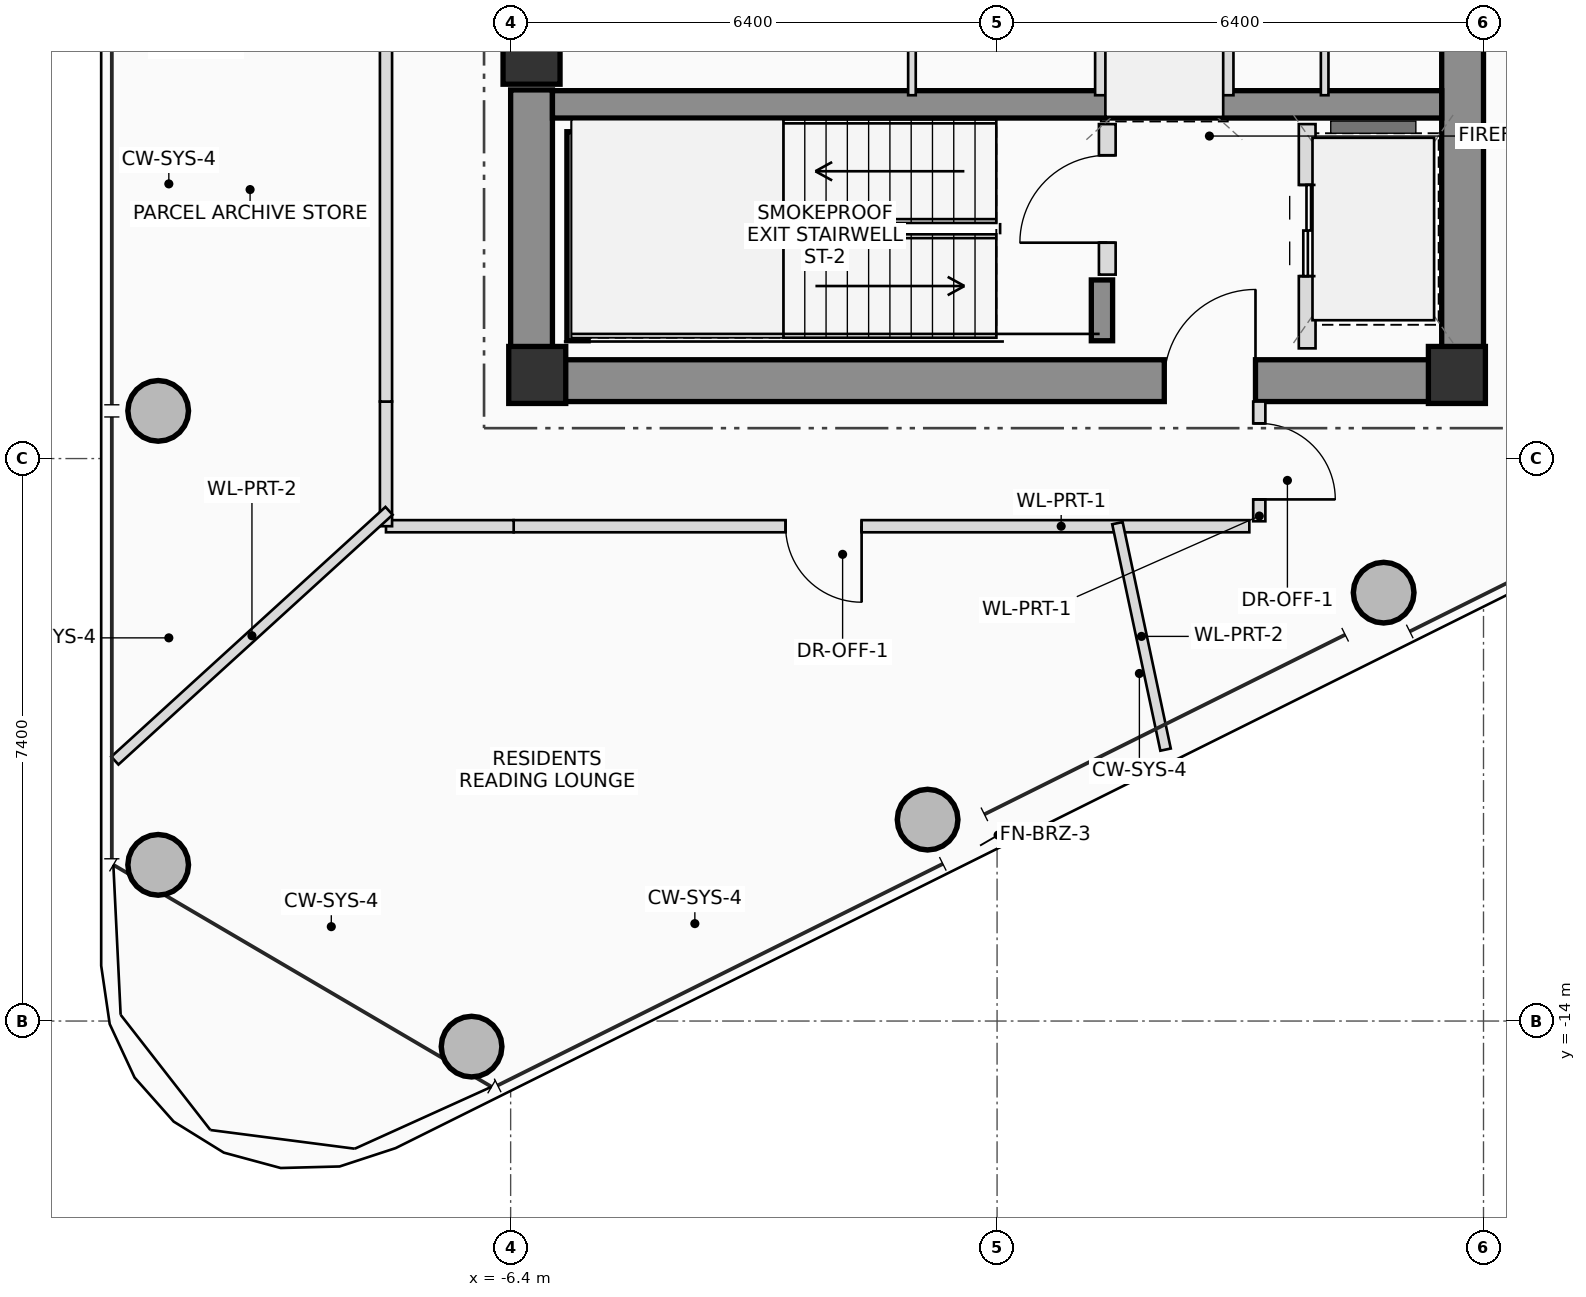
"""IFC4 building model, lengths in metres.
Left out: names, types, materials, properties, quantities, classifications, styles, units other than length and angle.
Written with IfcOpenShell. Run it as: python <this file> out.ifc"""

import sys

from ifc_helpers import new_model, si_unit, direction, frame, frame_2d, origin, origin_2d, place, context, subcontext, project, spatial, rectangle, hollow_circle, extrude, source, transform, mapped, element, fill, save


model = new_model("IFC4")
c1 = context("Model", 3, precision=1e-05, world=origin(), true_north=direction((0.0, 1.0)))
c2 = subcontext(c1, "Body", "Model", "MODEL_VIEW")
j1 = project(units=[si_unit("LENGTHUNIT", "METRE"), si_unit("PLANEANGLEUNIT", "RADIAN")], contexts=[c1])
p1 = place(None, origin())
s1 = spatial("IfcSite", under=j1, at=p1, CompositionType="ELEMENT")
p2 = place(p1, origin())
s2 = spatial("IfcBuilding", under=s1, at=p2, CompositionType="ELEMENT")
p3 = place(p2, frame((0.0, 0.0, 289.85)))
s3 = spatial("IfcBuildingStorey", under=s2, at=p3, CompositionType="ELEMENT", Elevation=289.85)
m1 = source(origin(), c2, "Body", "SweptSolid", [
    extrude(rectangle(XDim=0.75, YDim=0.75, at=origin_2d()), origin(), (0.0, 0.0, 1.0), 3.45),
])
for number, where, z_axis, x_axis in (
    (1, (-6.05, -5.5, 0.0), (0.0, 0.0, 1.0), (1.0, 0.0, 0.0)),
    (2, (6.05, -5.5, 0.0), (0.0, 0.0, 1.0), (1.0, 0.0, 0.0)),
):
    element("IfcColumn", number, at=place(p3, frame(where, z_axis=z_axis, x_axis=x_axis)), inside=s3, PredefinedType="COLUMN", context=c2, shape_type="MappedRepresentation", body=[
        mapped(m1, transform((0.0, 0.0, 0.0), scale=1.0)),
    ])
p4 = place(p3, frame((-6.4, -5.575, 0.0), z_axis=(0.0, 0.0, 1.0), x_axis=(1.0, 0.0, 0.0)))
e3 = element("IfcWall", 3, at=p4, inside=s3, PredefinedType="SHEAR", context=c2, shape_type="SweptSolid", body=[
    extrude(rectangle(XDim=12.8, YDim=0.55, at=frame_2d((6.4, 0.0))), origin(), (0.0, 0.0, 1.0), 3.45),
])
p5 = place(p4, frame((8.6, 0.0, 0.0)))
e4 = element("IfcOpeningElement", 4, at=p5, cuts=e3, PredefinedType="OPENING", context=c2, shape_type="SweptSolid", body=[
    extrude(rectangle(XDim=1.2, YDim=2.2, at=frame_2d((0.6, 1.1))), frame((0.0, 0.285, 0.0), z_axis=(0.0, -1.0, 0.0), x_axis=(1.0, 0.0, 0.0)), (0.0, 0.0, 1.0), 0.57),
])
p6 = place(p3, frame((6.125, -5.3, 0.0), z_axis=(0.0, 0.0, 1.0), x_axis=(0.0, 1.0, 0.0)))
e5 = element("IfcWall", 5, at=p6, inside=s3, PredefinedType="SHEAR", context=c2, shape_type="SweptSolid", body=[
    extrude(rectangle(XDim=10.6, YDim=0.55, at=frame_2d((5.3, 0.0))), origin(), (0.0, 0.0, 1.0), 3.45),
])
p7 = place(p3, frame((-6.125, -5.3, 0.0), z_axis=(0.0, 0.0, 1.0), x_axis=(0.0, 1.0, 0.0)))
e6 = element("IfcWall", 6, at=p7, inside=s3, PredefinedType="SHEAR", context=c2, shape_type="SweptSolid", body=[
    extrude(rectangle(XDim=3.55, YDim=0.55, at=frame_2d((1.775, 0.0))), origin(), (0.0, 0.0, 1.0), 3.45),
])
p8 = place(p3, frame((-5.85, -1.94, 0.0), z_axis=(0.0, 0.0, 1.0), x_axis=(1.0, 0.0, 0.0)))
e7 = element("IfcWall", 7, at=p8, inside=s3, PredefinedType="SHEAR", context=c2, shape_type="SweptSolid", body=[
    extrude(rectangle(XDim=11.7, YDim=0.36, at=frame_2d((5.85, 0.0))), origin(), (0.0, 0.0, 1.0), 3.45),
])
p9 = place(p3, frame((-5.52, -5.05, 0.0), z_axis=(0.0, 0.0, 1.0), x_axis=(0.0, 1.0, 0.0)))
e8 = element("IfcWall", 8, at=p9, inside=s3, PredefinedType="SHEAR", context=c2, shape_type="SweptSolid", body=[
    extrude(rectangle(XDim=2.75, YDim=0.28, at=frame_2d((1.375, 0.0))), origin(), (0.0, 0.0, 1.0), 3.45),
])
p10 = place(p3, frame((1.38, -5.05, 0.0), z_axis=(0.0, 0.0, 1.0), x_axis=(0.0, 1.0, 0.0)))
e9 = element("IfcWall", 9, at=p10, inside=s3, PredefinedType="SHEAR", context=c2, shape_type="SweptSolid", body=[
    extrude(rectangle(XDim=0.8, YDim=0.28, at=frame_2d((0.4, 0.0))), origin(), (0.0, 0.0, 1.0), 3.45),
])
p11 = place(p3, frame((-6.125, -1.3, 0.0), z_axis=(0.0, 0.0, 1.0), x_axis=(1.0, 0.0, 0.0)))
e10 = element("IfcColumn", 10, at=p11, inside=s3, PredefinedType="COLUMN", context=c2, shape_type="MappedRepresentation", body=[
    mapped(m1, transform((0.0, 0.0, 0.0), scale=1.0)),
])
m2 = source(origin(), c2, "Body", "SweptSolid", [
    extrude(hollow_circle(Radius=0.4, WallThickness=0.028, at=origin_2d()), origin(), (0.0, 0.0, 1.0), 3.45),
])
for number, where, z_axis, x_axis in (
    (11, (-6.914, -14.337, 0.0), (0.0, 0.0, 1.0), (1.0, 0.0, 0.0)),
    (12, (-0.914, -11.35, 0.0), (0.0, 0.0, 1.0), (1.0, 0.0, 0.0)),
    (13, (5.086, -8.364, 0.0), (0.0, 0.0, 1.0), (1.0, 0.0, 0.0)),
    (14, (-11.037, -5.973, 0.0), (0.0, 0.0, 1.0), (1.0, 0.0, 0.0)),
    (15, (-11.037, -11.945, 0.0), (0.0, 0.0, 1.0), (1.0, 0.0, 0.0)),
):
    element("IfcColumn", number, at=place(p3, frame(where, z_axis=z_axis, x_axis=x_axis)), inside=s3, PredefinedType="COLUMN", context=c2, shape_type="MappedRepresentation", body=[
        mapped(m2, transform((0.0, 0.0, 0.0), scale=1.0)),
    ])
p12 = place(p3, frame((1.45, -4.18, 0.0), z_axis=(0.0, 0.0, 1.0), x_axis=(0.0, 1.0, 0.0)))
e16 = element("IfcWall", 16, at=p12, inside=s3, PredefinedType="PLUMBINGWALL", context=c2, shape_type="SweptSolid", body=[
    extrude(rectangle(XDim=1.98, YDim=0.22, at=frame_2d((0.99, 0.0))), origin(), (0.0, 0.0, 1.0), 3.25),
])
p13 = place(p12, frame((0.42, 0.0, 0.0)))
e17 = element("IfcOpeningElement", 17, at=p13, cuts=e16, PredefinedType="OPENING", context=c2, shape_type="SweptSolid", body=[
    extrude(rectangle(XDim=1.15, YDim=2.15, at=frame_2d((0.575, 1.075))), frame((0.0, 0.12, 0.0), z_axis=(0.0, -1.0, 0.0), x_axis=(1.0, 0.0, 0.0)), (0.0, 0.0, 1.0), 0.24),
])
p14 = place(p3, frame((4.08, -5.15, 0.0), z_axis=(0.0, 0.0, 1.0), x_axis=(0.0, 1.0, 0.0)))
e18 = element("IfcWall", 18, at=p14, inside=s3, PredefinedType="PLUMBINGWALL", context=c2, shape_type="SweptSolid", body=[
    extrude(rectangle(XDim=2.95, YDim=0.22, at=frame_2d((1.475, 0.0))), origin(), (0.0, 0.0, 1.0), 3.25),
])
p15 = place(p14, frame((0.95, 0.0, 0.0)))
e19 = element("IfcOpeningElement", 19, at=p15, cuts=e18, PredefinedType="OPENING", context=c2, shape_type="SweptSolid", body=[
    extrude(rectangle(XDim=1.2, YDim=2.25, at=frame_2d((0.6, 1.125))), frame((0.0, 0.12, 0.0), z_axis=(0.0, -1.0, 0.0), x_axis=(1.0, 0.0, 0.0)), (0.0, 0.0, 1.0), 0.24),
])
p16 = place(p3, frame((-1.12, -1.82, 0.0), z_axis=(0.0, 0.0, 1.0), x_axis=(0.0, 1.0, 0.0)))
e20 = element("IfcWall", 20, at=p16, inside=s3, PredefinedType="PARTITIONING", context=c2, shape_type="SweptSolid", body=[
    extrude(rectangle(XDim=0.98, YDim=0.1, at=frame_2d((0.49, 0.0))), origin(), (0.0, 0.0, 1.0), 3.25),
])
for number, where, z_axis, x_axis in (
    (21, (1.38, -1.82, 0.0), (0.0, 0.0, 1.0), (0.0, 1.0, 0.0)),
    (22, (3.02, -1.82, 0.0), (0.0, 0.0, 1.0), (0.0, 1.0, 0.0)),
):
    element("IfcWall", number, at=place(p3, frame(where, z_axis=z_axis, x_axis=x_axis)), inside=s3, PredefinedType="PLUMBINGWALL", context=c2, shape_type="SweptSolid", body=[
        extrude(rectangle(XDim=0.98, YDim=0.18, at=frame_2d((0.49, 0.0))), origin(), (0.0, 0.0, 1.0), 3.25),
    ])
p17 = place(p3, frame((4.31, -1.82, 0.0), z_axis=(0.0, 0.0, 1.0), x_axis=(0.0, 1.0, 0.0)))
e23 = element("IfcWall", 23, at=p17, inside=s3, PredefinedType="PARTITIONING", context=c2, shape_type="SweptSolid", body=[
    extrude(rectangle(XDim=0.98, YDim=0.1, at=frame_2d((0.49, 0.0))), origin(), (0.0, 0.0, 1.0), 3.25),
])
p18 = place(p3, frame((3.45, -5.85, 0.0), z_axis=(0.0, 0.0, 1.0), x_axis=(0.0, -1.0, 0.0)))
e24 = element("IfcWall", 24, at=p18, inside=s3, PredefinedType="PARTITIONING", context=c2, shape_type="SweptSolid", body=[
    extrude(rectangle(XDim=1.575, YDim=0.16, at=frame_2d((0.787, 0.0))), origin(), (0.0, 0.0, 1.0), 2.855),
])
p19 = place(p18, frame((0.287, 0.0, 0.0)))
e25 = element("IfcOpeningElement", 25, at=p19, cuts=e24, PredefinedType="OPENING", context=c2, shape_type="SweptSolid", body=[
    extrude(rectangle(XDim=1.0, YDim=2.25, at=frame_2d((0.5, 1.125))), frame((0.0, 0.09, 0.0), z_axis=(0.0, -1.0, 0.0), x_axis=(1.0, 0.0, 0.0)), (0.0, 0.0, 1.0), 0.18),
])
p20 = place(p3, frame((3.319, -7.49, 0.0), z_axis=(0.0, 0.0, 1.0), x_axis=(-1.0, 0.0, 0.0)))
e26 = element("IfcWall", 26, at=p20, inside=s3, PredefinedType="PARTITIONING", context=c2, shape_type="SweptSolid", body=[
    extrude(rectangle(XDim=9.679, YDim=0.16, at=frame_2d((4.84, 0.0))), origin(), (0.0, 0.0, 1.0), 2.655),
])
p21 = place(p20, frame((5.101, 0.0, 0.0)))
e27 = element("IfcOpeningElement", 27, at=p21, cuts=e26, PredefinedType="OPENING", context=c2, shape_type="SweptSolid", body=[
    extrude(rectangle(XDim=1.0, YDim=2.25, at=frame_2d((0.5, 1.125))), frame((0.0, 0.09, 0.0), z_axis=(0.0, -1.0, 0.0), x_axis=(1.0, 0.0, 0.0)), (0.0, 0.0, 1.0), 0.18),
])
p22 = place(p3, frame((-6.36, -7.49, 0.0), z_axis=(0.0, 0.0, 1.0), x_axis=(-1.0, 0.0, 0.0)))
e28 = element("IfcWall", 28, at=p22, inside=s3, PredefinedType="PARTITIONING", context=c2, shape_type="SweptSolid", body=[
    extrude(rectangle(XDim=1.68, YDim=0.16, at=frame_2d((0.84, 0.0))), origin(), (0.0, 0.0, 1.0), 2.655),
])
p23 = place(p3, frame((-8.04, -7.49, 0.0), z_axis=(0.0, 0.0, 1.0), x_axis=(0.0, 1.0, 0.0)))
e29 = element("IfcWall", 29, at=p23, inside=s3, PredefinedType="PARTITIONING", context=c2, shape_type="SweptSolid", body=[
    extrude(rectangle(XDim=1.64, YDim=0.16, at=frame_2d((0.82, 0.0))), origin(), (0.0, 0.0, 1.0), 3.25),
])
p24 = place(p3, frame((-8.04, -5.85, 0.0), z_axis=(0.0, 0.0, 1.0), x_axis=(0.0, 1.0, 0.0)))
e30 = element("IfcWall", 30, at=p24, inside=s3, PredefinedType="PARTITIONING", context=c2, shape_type="SweptSolid", body=[
    extrude(rectangle(XDim=11.7, YDim=0.16, at=frame_2d((5.85, 0.0))), origin(), (0.0, 0.0, 1.0), 2.655),
])
p25 = place(p24, frame((5.189, 0.0, 0.0)))
e31 = element("IfcOpeningElement", 31, at=p25, cuts=e30, PredefinedType="OPENING", context=c2, shape_type="SweptSolid", body=[
    extrude(rectangle(XDim=1.0, YDim=2.25, at=frame_2d((0.5, 1.125))), frame((0.0, 0.09, 0.0), z_axis=(0.0, -1.0, 0.0), x_axis=(1.0, 0.0, 0.0)), (0.0, 0.0, 1.0), 0.18),
])
p26 = place(p3, frame((-8.0, -7.288, 0.0), z_axis=(0.0, 0.0, 1.0), x_axis=(-0.739260540131, -0.673419522886, 0.0)))
e32 = element("IfcWall", 32, at=p26, inside=s3, PredefinedType="PARTITIONING", context=c2, shape_type="SweptSolid", body=[
    extrude(rectangle(XDim=4.88, YDim=0.14, at=frame_2d((2.44, 0.0))), origin(), (0.0, 0.0, 1.0), 2.815),
])
p27 = place(p3, frame((1.583, -7.45, 0.0), z_axis=(0.0, 0.0, 1.0), x_axis=(0.207941206443, -0.978141326529, 0.0)))
e33 = element("IfcWall", 33, at=p27, inside=s3, PredefinedType="PARTITIONING", context=c2, shape_type="SweptSolid", body=[
    extrude(rectangle(XDim=3.046, YDim=0.14, at=frame_2d((1.523, 0.0))), origin(), (0.0, 0.0, 1.0), 2.815),
])
p28 = place(p5, origin())
e34 = element("IfcDoor", 34, at=p28, inside=s3, OperationType="SINGLE_SWING_RIGHT", PredefinedType="DOOR", context=c2, shape_type="SweptSolid", body=[
    extrude(rectangle(XDim=1.2, YDim=2.2, at=frame_2d((0.6, 1.1))), frame((0.0, 0.025, 0.0), z_axis=(0.0, -1.0, 0.0), x_axis=(1.0, 0.0, 0.0)), (0.0, 0.0, 1.0), 0.05),
])
fill(e4, e34)
p29 = place(p13, origin())
e35 = element("IfcDoor", 35, at=p29, inside=s3, OperationType="SINGLE_SWING_LEFT", PredefinedType="DOOR", context=c2, shape_type="SweptSolid", body=[
    extrude(rectangle(XDim=1.15, YDim=2.15, at=frame_2d((0.575, 1.075))), frame((0.0, 0.025, 0.0), z_axis=(0.0, -1.0, 0.0), x_axis=(1.0, 0.0, 0.0)), (0.0, 0.0, 1.0), 0.05),
])
fill(e17, e35)
p30 = place(p15, origin())
e36 = element("IfcDoor", 36, at=p30, inside=s3, OperationType="DOUBLE_DOOR_SLIDING", PredefinedType="DOOR", context=c2, shape_type="SweptSolid", body=[
    extrude(rectangle(XDim=1.2, YDim=2.25, at=frame_2d((0.6, 1.125))), frame((0.0, 0.025, 0.0), z_axis=(0.0, -1.0, 0.0), x_axis=(1.0, 0.0, 0.0)), (0.0, 0.0, 1.0), 0.05),
])
fill(e19, e36)
p31 = place(p19, origin())
e37 = element("IfcDoor", 37, at=p31, inside=s3, OperationType="SINGLE_SWING_RIGHT", PredefinedType="DOOR", context=c2, shape_type="SweptSolid", body=[
    extrude(rectangle(XDim=1.0, YDim=2.25, at=frame_2d((0.5, 1.125))), frame((0.0, 0.025, 0.0), z_axis=(0.0, -1.0, 0.0), x_axis=(1.0, 0.0, 0.0)), (0.0, 0.0, 1.0), 0.05),
])
fill(e25, e37)
p32 = place(p21, origin())
e38 = element("IfcDoor", 38, at=p32, inside=s3, OperationType="SINGLE_SWING_LEFT", PredefinedType="DOOR", context=c2, shape_type="SweptSolid", body=[
    extrude(rectangle(XDim=1.0, YDim=2.25, at=frame_2d((0.5, 1.125))), frame((0.0, 0.025, 0.0), z_axis=(0.0, -1.0, 0.0), x_axis=(1.0, 0.0, 0.0)), (0.0, 0.0, 1.0), 0.05),
])
fill(e27, e38)
save(model, sys.argv[1])
